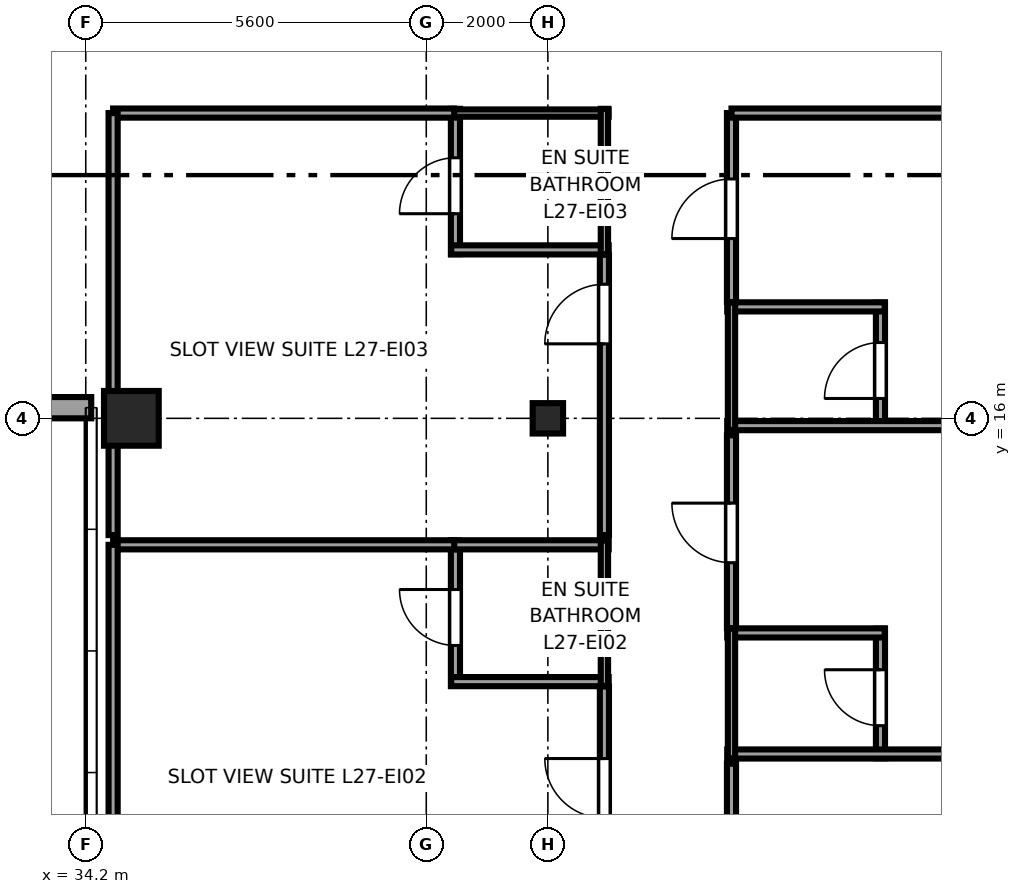
"""IFC4 building model, lengths in metres.
Left out: names, types, materials, properties, quantities, classifications, styles, units other than length and angle.
Written with IfcOpenShell. Run it as: python <this file> out.ifc"""

import sys

from ifc_helpers import new_model, si_unit, direction, frame, frame_2d, origin, origin_2d, place, context, subcontext, project, spatial, rectangle, i_section, extrude, source, transform, mapped, element, fill, save


model = new_model("IFC4")
c1 = context("Model", 3, precision=1e-05, world=origin(), true_north=direction((0.0, 1.0)))
c2 = subcontext(c1, "Body", "Model", "MODEL_VIEW")
j1 = project(units=[si_unit("LENGTHUNIT", "METRE"), si_unit("PLANEANGLEUNIT", "RADIAN")], contexts=[c1])
p1 = place(None, origin())
s1 = spatial("IfcSite", under=j1, at=p1, CompositionType="ELEMENT")
p2 = place(p1, origin())
s2 = spatial("IfcBuilding", under=s1, at=p2, CompositionType="ELEMENT")
p3 = place(p2, frame((0.0, 0.0, 108.0)))
s3 = spatial("IfcBuildingStorey", under=s2, at=p3, CompositionType="ELEMENT", Elevation=108.0)
m1 = source(origin(), c2, "Body", "SweptSolid", [
    extrude(rectangle(XDim=0.9, YDim=0.9, at=origin_2d()), origin(), (0.0, 0.0, 1.0), 3.55),
])
p4 = place(p3, frame((34.95, 16.0, 0.0), z_axis=(0.0, 0.0, 1.0), x_axis=(1.0, 0.0, 0.0)))
e1 = element("IfcColumn", 1, at=p4, inside=s3, PredefinedType="COLUMN", context=c2, shape_type="MappedRepresentation", body=[
    mapped(m1, transform((0.0, 0.0, 0.0), x_axis=(1.0, 0.0, 0.0), y_axis=(0.0, 1.0, 0.0), z_axis=(0.0, 0.0, 1.0), scale=1.0)),
])
m2 = source(origin(), c2, "Body", "SweptSolid", [
    extrude(i_section(OverallWidth=0.5, OverallDepth=0.5, WebThickness=0.022, FlangeThickness=0.034, at=origin_2d()), origin(), (0.0, 0.0, 1.0), 3.55),
])
p5 = place(p3, frame((41.8, 16.0, 0.0), z_axis=(0.0, 0.0, 1.0), x_axis=(1.0, 0.0, 0.0)))
e2 = element("IfcColumn", 2, at=p5, inside=s3, PredefinedType="COLUMN", context=c2, shape_type="MappedRepresentation", body=[
    mapped(m2, transform((0.0, 0.0, 0.0), x_axis=(1.0, 0.0, 0.0), y_axis=(0.0, 1.0, 0.0), z_axis=(0.0, 0.0, 1.0), scale=1.0)),
])
p6 = place(p3, frame((22.71, 16.175, 0.0), z_axis=(0.0, 0.0, 1.0), x_axis=(1.0, 0.0, 0.0)))
e3 = element("IfcWall", 3, at=p6, inside=s3, PredefinedType="SOLIDWALL", context=c2, shape_type="SweptSolid", body=[
    extrude(rectangle(XDim=11.58, YDim=0.35, at=frame_2d((5.79, 0.0))), origin(), (0.0, 0.0, 1.0), 2.748),
])
p7 = place(p6, frame((2.145, 0.0, 0.68)))
e4 = element("IfcOpeningElement", 4, at=p7, cuts=e3, PredefinedType="OPENING", context=c2, shape_type="SweptSolid", body=[
    extrude(rectangle(XDim=2.1, YDim=1.9, at=frame_2d((1.05, 0.95))), frame((0.0, 0.185, 0.0), z_axis=(0.0, -1.0, 0.0), x_axis=(1.0, 0.0, 0.0)), (0.0, 0.0, 1.0), 0.37),
])
p8 = place(p6, frame((7.335, 0.0, 0.68)))
e5 = element("IfcOpeningElement", 5, at=p8, cuts=e3, PredefinedType="OPENING", context=c2, shape_type="SweptSolid", body=[
    extrude(rectangle(XDim=2.1, YDim=1.9, at=frame_2d((1.05, 0.95))), frame((0.0, 0.185, 0.0), z_axis=(0.0, -1.0, 0.0), x_axis=(1.0, 0.0, 0.0)), (0.0, 0.0, 1.0), 0.37),
])
p9 = place(p3, frame((40.28, 11.6, 0.0), z_axis=(0.0, 0.0, 1.0), x_axis=(0.0, 1.0, 0.0)))
e6 = element("IfcWall", 6, at=p9, inside=s3, PredefinedType="PARTITIONING", context=c2, shape_type="SweptSolid", body=[
    extrude(rectangle(XDim=2.39, YDim=0.15, at=frame_2d((1.195, 0.0))), origin(), (0.0, 0.0, 1.0), 3.37),
])
p10 = place(p9, frame((0.665, 0.0, 0.0)))
e7 = element("IfcOpeningElement", 7, at=p10, cuts=e6, PredefinedType="OPENING", context=c2, shape_type="SweptSolid", body=[
    extrude(rectangle(XDim=0.92, YDim=2.01, at=frame_2d((0.46, 1.005))), frame((0.0, 0.085, 0.0), z_axis=(0.0, -1.0, 0.0), x_axis=(1.0, 0.0, 0.0)), (0.0, 0.0, 1.0), 0.17),
])
for number, where, z_axis, x_axis in (
    (8, (40.21, 11.67, 0.0), (0.0, 0.0, 1.0), (1.0, 0.0, 0.0)),
    (9, (40.21, 13.92, 0.0), (0.0, 0.0, 1.0), (1.0, 0.0, 0.0)),
):
    element("IfcWall", number, at=place(p3, frame(where, z_axis=z_axis, x_axis=x_axis)), inside=s3, PredefinedType="PARTITIONING", context=c2, shape_type="SweptSolid", body=[
        extrude(rectangle(XDim=2.59, YDim=0.15, at=frame_2d((1.295, 0.0))), origin(), (0.0, 0.0, 1.0), 3.37),
    ])
p11 = place(p3, frame((42.73, 11.6, 0.0), z_axis=(0.0, 0.0, 1.0), x_axis=(0.0, 1.0, 0.0)))
e10 = element("IfcWall", 10, at=p11, inside=s3, PredefinedType="PLUMBINGWALL", context=c2, shape_type="SweptSolid", body=[
    extrude(rectangle(XDim=2.39, YDim=0.12, at=frame_2d((1.195, 0.0))), origin(), (0.0, 0.0, 1.0), 3.37),
])
p12 = place(p3, frame((40.28, 18.7, 0.0), z_axis=(0.0, 0.0, 1.0), x_axis=(0.0, 1.0, 0.0)))
e11 = element("IfcWall", 11, at=p12, inside=s3, PredefinedType="PARTITIONING", context=c2, shape_type="SweptSolid", body=[
    extrude(rectangle(XDim=2.39, YDim=0.15, at=frame_2d((1.195, 0.0))), origin(), (0.0, 0.0, 1.0), 3.37),
])
p13 = place(p12, frame((0.665, 0.0, 0.0)))
e12 = element("IfcOpeningElement", 12, at=p13, cuts=e11, PredefinedType="OPENING", context=c2, shape_type="SweptSolid", body=[
    extrude(rectangle(XDim=0.92, YDim=2.01, at=frame_2d((0.46, 1.005))), frame((0.0, 0.085, 0.0), z_axis=(0.0, -1.0, 0.0), x_axis=(1.0, 0.0, 0.0)), (0.0, 0.0, 1.0), 0.17),
])
p14 = place(p3, frame((40.21, 18.77, 0.0), z_axis=(0.0, 0.0, 1.0), x_axis=(1.0, 0.0, 0.0)))
e13 = element("IfcWall", 13, at=p14, inside=s3, PredefinedType="PARTITIONING", context=c2, shape_type="SweptSolid", body=[
    extrude(rectangle(XDim=2.59, YDim=0.15, at=frame_2d((1.295, 0.0))), origin(), (0.0, 0.0, 1.0), 3.37),
])
p15 = place(p3, frame((40.21, 21.02, 0.0), z_axis=(0.0, 0.0, 1.0), x_axis=(1.0, 0.0, 0.0)))
e14 = element("IfcWall", 14, at=p15, inside=s3, PredefinedType="PLUMBINGWALL", context=c2, shape_type="SweptSolid", body=[
    extrude(rectangle(XDim=2.59, YDim=0.12, at=frame_2d((1.295, 0.0))), origin(), (0.0, 0.0, 1.0), 3.37),
])
p16 = place(p3, frame((42.73, 18.7, 0.0), z_axis=(0.0, 0.0, 1.0), x_axis=(0.0, 1.0, 0.0)))
e15 = element("IfcWall", 15, at=p16, inside=s3, PredefinedType="PLUMBINGWALL", context=c2, shape_type="SweptSolid", body=[
    extrude(rectangle(XDim=2.39, YDim=0.12, at=frame_2d((1.195, 0.0))), origin(), (0.0, 0.0, 1.0), 3.37),
])
p17 = place(p3, frame((47.27, 10.41, 0.0), z_axis=(0.0, 0.0, 1.0), x_axis=(0.0, 1.0, 0.0)))
e16 = element("IfcWall", 16, at=p17, inside=s3, PredefinedType="PARTITIONING", context=c2, shape_type="SweptSolid", body=[
    extrude(rectangle(XDim=2.131, YDim=0.15, at=frame_2d((1.065, 0.0))), origin(), (0.0, 0.0, 1.0), 3.37),
])
p18 = place(p17, frame((0.535, 0.0, 0.0)))
e17 = element("IfcOpeningElement", 17, at=p18, cuts=e16, PredefinedType="OPENING", context=c2, shape_type="SweptSolid", body=[
    extrude(rectangle(XDim=0.92, YDim=2.01, at=frame_2d((0.46, 1.005))), frame((0.0, 0.085, 0.0), z_axis=(0.0, -1.0, 0.0), x_axis=(1.0, 0.0, 0.0)), (0.0, 0.0, 1.0), 0.17),
])
p19 = place(p3, frame((44.75, 10.48, 0.0), z_axis=(0.0, 0.0, 1.0), x_axis=(1.0, 0.0, 0.0)))
e18 = element("IfcWall", 18, at=p19, inside=s3, PredefinedType="PARTITIONING", context=c2, shape_type="SweptSolid", body=[
    extrude(rectangle(XDim=11.845, YDim=0.15, at=frame_2d((5.922, 0.0))), origin(), (0.0, 0.0, 1.0), 3.37),
])
p20 = place(p3, frame((44.75, 12.471, 0.0), z_axis=(0.0, 0.0, 1.0), x_axis=(1.0, 0.0, 0.0)))
e19 = element("IfcWall", 19, at=p20, inside=s3, PredefinedType="PARTITIONING", context=c2, shape_type="SweptSolid", body=[
    extrude(rectangle(XDim=2.59, YDim=0.15, at=frame_2d((1.295, 0.0))), origin(), (0.0, 0.0, 1.0), 3.37),
])
p21 = place(p3, frame((44.82, 10.41, 0.0), z_axis=(0.0, 0.0, 1.0), x_axis=(0.0, 1.0, 0.0)))
e20 = element("IfcWall", 20, at=p21, inside=s3, PredefinedType="PLUMBINGWALL", context=c2, shape_type="SweptSolid", body=[
    extrude(rectangle(XDim=2.131, YDim=0.12, at=frame_2d((1.065, 0.0))), origin(), (0.0, 0.0, 1.0), 3.37),
])
p22 = place(p3, frame((47.27, 15.81, 0.0), z_axis=(0.0, 0.0, 1.0), x_axis=(0.0, 1.0, 0.0)))
e21 = element("IfcWall", 21, at=p22, inside=s3, PredefinedType="PARTITIONING", context=c2, shape_type="SweptSolid", body=[
    extrude(rectangle(XDim=2.093, YDim=0.15, at=frame_2d((1.046, 0.0))), origin(), (0.0, 0.0, 1.0), 3.37),
])
p23 = place(p22, frame((0.517, 0.0, 0.0)))
e22 = element("IfcOpeningElement", 22, at=p23, cuts=e21, PredefinedType="OPENING", context=c2, shape_type="SweptSolid", body=[
    extrude(rectangle(XDim=0.92, YDim=2.01, at=frame_2d((0.46, 1.005))), frame((0.0, 0.085, 0.0), z_axis=(0.0, -1.0, 0.0), x_axis=(1.0, 0.0, 0.0)), (0.0, 0.0, 1.0), 0.17),
])
p24 = place(p3, frame((44.75, 15.88, 0.0), z_axis=(0.0, 0.0, 1.0), x_axis=(1.0, 0.0, 0.0)))
e23 = element("IfcWall", 23, at=p24, inside=s3, PredefinedType="PARTITIONING", context=c2, shape_type="SweptSolid", body=[
    extrude(rectangle(XDim=11.845, YDim=0.15, at=frame_2d((5.922, 0.0))), origin(), (0.0, 0.0, 1.0), 2.748),
])
p25 = place(p3, frame((44.75, 17.833, 0.0), z_axis=(0.0, 0.0, 1.0), x_axis=(1.0, 0.0, 0.0)))
e24 = element("IfcWall", 24, at=p25, inside=s3, PredefinedType="PARTITIONING", context=c2, shape_type="SweptSolid", body=[
    extrude(rectangle(XDim=2.59, YDim=0.15, at=frame_2d((1.295, 0.0))), origin(), (0.0, 0.0, 1.0), 3.37),
])
p26 = place(p3, frame((44.82, 15.81, 0.0), z_axis=(0.0, 0.0, 1.0), x_axis=(0.0, 1.0, 0.0)))
e25 = element("IfcWall", 25, at=p26, inside=s3, PredefinedType="PLUMBINGWALL", context=c2, shape_type="SweptSolid", body=[
    extrude(rectangle(XDim=2.093, YDim=0.12, at=frame_2d((1.046, 0.0))), origin(), (0.0, 0.0, 1.0), 3.37),
])
p27 = place(p3, frame((42.73, 7.08, 0.0), z_axis=(0.0, 0.0, 1.0), x_axis=(0.0, 1.0, 0.0)))
e26 = element("IfcWall", 26, at=p27, inside=s3, PredefinedType="PARTITIONING", context=c2, shape_type="SweptSolid", body=[
    extrude(rectangle(XDim=4.51, YDim=0.15, at=frame_2d((2.255, 0.0))), origin(), (0.0, 0.0, 1.0), 3.37),
])
p28 = place(p27, frame((2.345, 0.0, 0.0)))
e27 = element("IfcOpeningElement", 27, at=p28, cuts=e26, PredefinedType="OPENING", context=c2, shape_type="SweptSolid", body=[
    extrude(rectangle(XDim=0.98, YDim=2.12, at=frame_2d((0.49, 1.06))), frame((0.0, 0.085, 0.0), z_axis=(0.0, -1.0, 0.0), x_axis=(1.0, 0.0, 0.0)), (0.0, 0.0, 1.0), 0.17),
])
p29 = place(p3, frame((34.65, 13.92, 0.0), z_axis=(0.0, 0.0, 1.0), x_axis=(1.0, 0.0, 0.0)))
e28 = element("IfcWall", 28, at=p29, inside=s3, PredefinedType="PARTITIONING", context=c2, shape_type="SweptSolid", body=[
    extrude(rectangle(XDim=5.61, YDim=0.15, at=frame_2d((2.805, 0.0))), origin(), (0.0, 0.0, 1.0), 3.37),
])
p30 = place(p3, frame((34.65, 7.08, 0.0), z_axis=(0.0, 0.0, 1.0), x_axis=(0.0, 1.0, 0.0)))
e29 = element("IfcWall", 29, at=p30, inside=s3, PredefinedType="PARTITIONING", context=c2, shape_type="SweptSolid", body=[
    extrude(rectangle(XDim=6.84, YDim=0.15, at=frame_2d((3.42, 0.0))), origin(), (0.0, 0.0, 1.0), 3.37),
])
p31 = place(p3, frame((42.73, 14.08, 0.0), z_axis=(0.0, 0.0, 1.0), x_axis=(0.0, 1.0, 0.0)))
e30 = element("IfcWall", 30, at=p31, inside=s3, PredefinedType="PARTITIONING", context=c2, shape_type="SweptSolid", body=[
    extrude(rectangle(XDim=4.61, YDim=0.15, at=frame_2d((2.305, 0.0))), origin(), (0.0, 0.0, 1.0), 3.37),
])
p32 = place(p31, frame((3.145, 0.0, 0.0)))
e31 = element("IfcOpeningElement", 31, at=p32, cuts=e30, PredefinedType="OPENING", context=c2, shape_type="SweptSolid", body=[
    extrude(rectangle(XDim=0.98, YDim=2.12, at=frame_2d((0.49, 1.06))), frame((0.0, 0.085, 0.0), z_axis=(0.0, -1.0, 0.0), x_axis=(1.0, 0.0, 0.0)), (0.0, 0.0, 1.0), 0.17),
])
p33 = place(p3, frame((34.65, 21.02, 0.0), z_axis=(0.0, 0.0, 1.0), x_axis=(1.0, 0.0, 0.0)))
e32 = element("IfcWall", 32, at=p33, inside=s3, PredefinedType="PARTITIONING", context=c2, shape_type="SweptSolid", body=[
    extrude(rectangle(XDim=5.61, YDim=0.15, at=frame_2d((2.805, 0.0))), origin(), (0.0, 0.0, 1.0), 3.37),
])
p34 = place(p3, frame((34.65, 14.08, 0.0), z_axis=(0.0, 0.0, 1.0), x_axis=(0.0, 1.0, 0.0)))
e33 = element("IfcWall", 33, at=p34, inside=s3, PredefinedType="PARTITIONING", context=c2, shape_type="SweptSolid", body=[
    extrude(rectangle(XDim=6.94, YDim=0.15, at=frame_2d((3.47, 0.0))), origin(), (0.0, 0.0, 1.0), 3.37),
])
p35 = place(p3, frame((44.82, 7.151, 0.0), z_axis=(0.0, 0.0, 1.0), x_axis=(0.0, 1.0, 0.0)))
e34 = element("IfcWall", 34, at=p35, inside=s3, PredefinedType="PARTITIONING", context=c2, shape_type="SweptSolid", body=[
    extrude(rectangle(XDim=3.169, YDim=0.15, at=frame_2d((1.584, 0.0))), origin(), (0.0, 0.0, 1.0), 3.37),
])
p36 = place(p35, frame((1.074, 0.0, 0.0)))
e35 = element("IfcOpeningElement", 35, at=p36, cuts=e34, PredefinedType="OPENING", context=c2, shape_type="SweptSolid", body=[
    extrude(rectangle(XDim=0.98, YDim=2.12, at=frame_2d((0.49, 1.06))), frame((0.0, 0.085, 0.0), z_axis=(0.0, -1.0, 0.0), x_axis=(1.0, 0.0, 0.0)), (0.0, 0.0, 1.0), 0.17),
])
p37 = place(p3, frame((44.82, 12.551, 0.0), z_axis=(0.0, 0.0, 1.0), x_axis=(0.0, 1.0, 0.0)))
e36 = element("IfcWall", 36, at=p37, inside=s3, PredefinedType="PARTITIONING", context=c2, shape_type="SweptSolid", body=[
    extrude(rectangle(XDim=3.169, YDim=0.15, at=frame_2d((1.584, 0.0))), origin(), (0.0, 0.0, 1.0), 3.37),
])
p38 = place(p37, frame((1.074, 0.0, 0.0)))
e37 = element("IfcOpeningElement", 37, at=p38, cuts=e36, PredefinedType="OPENING", context=c2, shape_type="SweptSolid", body=[
    extrude(rectangle(XDim=0.98, YDim=2.12, at=frame_2d((0.49, 1.06))), frame((0.0, 0.085, 0.0), z_axis=(0.0, -1.0, 0.0), x_axis=(1.0, 0.0, 0.0)), (0.0, 0.0, 1.0), 0.17),
])
p39 = place(p3, frame((44.82, 17.913, 0.0), z_axis=(0.0, 0.0, 1.0), x_axis=(0.0, 1.0, 0.0)))
e38 = element("IfcWall", 38, at=p39, inside=s3, PredefinedType="PARTITIONING", context=c2, shape_type="SweptSolid", body=[
    extrude(rectangle(XDim=3.107, YDim=0.15, at=frame_2d((1.553, 0.0))), origin(), (0.0, 0.0, 1.0), 3.37),
])
p40 = place(p39, frame((1.043, 0.0, 0.0)))
e39 = element("IfcOpeningElement", 39, at=p40, cuts=e38, PredefinedType="OPENING", context=c2, shape_type="SweptSolid", body=[
    extrude(rectangle(XDim=0.98, YDim=2.12, at=frame_2d((0.49, 1.06))), frame((0.0, 0.085, 0.0), z_axis=(0.0, -1.0, 0.0), x_axis=(1.0, 0.0, 0.0)), (0.0, 0.0, 1.0), 0.17),
])
p41 = place(p3, frame((44.82, 21.02, 0.0), z_axis=(0.0, 0.0, 1.0), x_axis=(1.0, 0.0, 0.0)))
e40 = element("IfcWall", 40, at=p41, inside=s3, PredefinedType="PARTITIONING", context=c2, shape_type="SweptSolid", body=[
    extrude(rectangle(XDim=11.775, YDim=0.15, at=frame_2d((5.887, 0.0))), origin(), (0.0, 0.0, 1.0), 3.37),
])
m3 = source(origin(), c2, "Body", "SweptSolid", [
    extrude(rectangle(XDim=0.92, YDim=2.01, at=frame_2d((0.46, 1.005))), frame((0.0, 0.025, 0.0), z_axis=(0.0, -1.0, 0.0), x_axis=(1.0, 0.0, 0.0)), (0.0, 0.0, 1.0), 0.05),
])
p42 = place(p10, origin())
e41 = element("IfcDoor", 41, at=p42, inside=s3, OperationType="SINGLE_SWING_RIGHT", PredefinedType="DOOR", context=c2, shape_type="MappedRepresentation", body=[
    mapped(m3, transform((0.0, 0.0, 0.0), x_axis=(1.0, 0.0, 0.0), y_axis=(0.0, 1.0, 0.0), z_axis=(0.0, 0.0, 1.0), scale=1.0)),
])
fill(e7, e41)
p43 = place(p13, origin())
e42 = element("IfcDoor", 42, at=p43, inside=s3, OperationType="SINGLE_SWING_LEFT", PredefinedType="DOOR", context=c2, shape_type="MappedRepresentation", body=[
    mapped(m3, transform((0.0, 0.0, 0.0), x_axis=(1.0, 0.0, 0.0), y_axis=(0.0, 1.0, 0.0), z_axis=(0.0, 0.0, 1.0), scale=1.0)),
])
fill(e12, e42)
p44 = place(p18, origin())
e43 = element("IfcDoor", 43, at=p44, inside=s3, OperationType="SINGLE_SWING_RIGHT", PredefinedType="DOOR", context=c2, shape_type="MappedRepresentation", body=[
    mapped(m3, transform((0.0, 0.0, 0.0), x_axis=(1.0, 0.0, 0.0), y_axis=(0.0, 1.0, 0.0), z_axis=(0.0, 0.0, 1.0), scale=1.0)),
])
fill(e17, e43)
p45 = place(p23, origin())
e44 = element("IfcDoor", 44, at=p45, inside=s3, OperationType="SINGLE_SWING_LEFT", PredefinedType="DOOR", context=c2, shape_type="MappedRepresentation", body=[
    mapped(m3, transform((0.0, 0.0, 0.0), x_axis=(1.0, 0.0, 0.0), y_axis=(0.0, 1.0, 0.0), z_axis=(0.0, 0.0, 1.0), scale=1.0)),
])
fill(e22, e44)
m4 = source(origin(), c2, "Body", "SweptSolid", [
    extrude(rectangle(XDim=0.98, YDim=2.12, at=frame_2d((0.49, 1.06))), frame((0.0, 0.025, 0.0), z_axis=(0.0, -1.0, 0.0), x_axis=(1.0, 0.0, 0.0)), (0.0, 0.0, 1.0), 0.05),
])
p46 = place(p28, origin())
e45 = element("IfcDoor", 45, at=p46, inside=s3, OperationType="SINGLE_SWING_RIGHT", PredefinedType="DOOR", context=c2, shape_type="MappedRepresentation", body=[
    mapped(m4, transform((0.0, 0.0, 0.0), x_axis=(1.0, 0.0, 0.0), y_axis=(0.0, 1.0, 0.0), z_axis=(0.0, 0.0, 1.0), scale=1.0)),
])
fill(e27, e45)
p47 = place(p32, origin())
e46 = element("IfcDoor", 46, at=p47, inside=s3, OperationType="SINGLE_SWING_LEFT", PredefinedType="DOOR", context=c2, shape_type="MappedRepresentation", body=[
    mapped(m4, transform((0.0, 0.0, 0.0), x_axis=(1.0, 0.0, 0.0), y_axis=(0.0, 1.0, 0.0), z_axis=(0.0, 0.0, 1.0), scale=1.0)),
])
fill(e31, e46)
p48 = place(p38, origin())
e47 = element("IfcDoor", 47, at=p48, inside=s3, OperationType="SINGLE_SWING_RIGHT", PredefinedType="DOOR", context=c2, shape_type="MappedRepresentation", body=[
    mapped(m4, transform((0.0, 0.0, 0.0), x_axis=(1.0, 0.0, 0.0), y_axis=(0.0, 1.0, 0.0), z_axis=(0.0, 0.0, 1.0), scale=1.0)),
])
fill(e37, e47)
p49 = place(p40, origin())
e48 = element("IfcDoor", 48, at=p49, inside=s3, OperationType="SINGLE_SWING_LEFT", PredefinedType="DOOR", context=c2, shape_type="MappedRepresentation", body=[
    mapped(m4, transform((0.0, 0.0, 0.0), x_axis=(1.0, 0.0, 0.0), y_axis=(0.0, 1.0, 0.0), z_axis=(0.0, 0.0, 1.0), scale=1.0)),
])
fill(e39, e48)
save(model, sys.argv[1])
